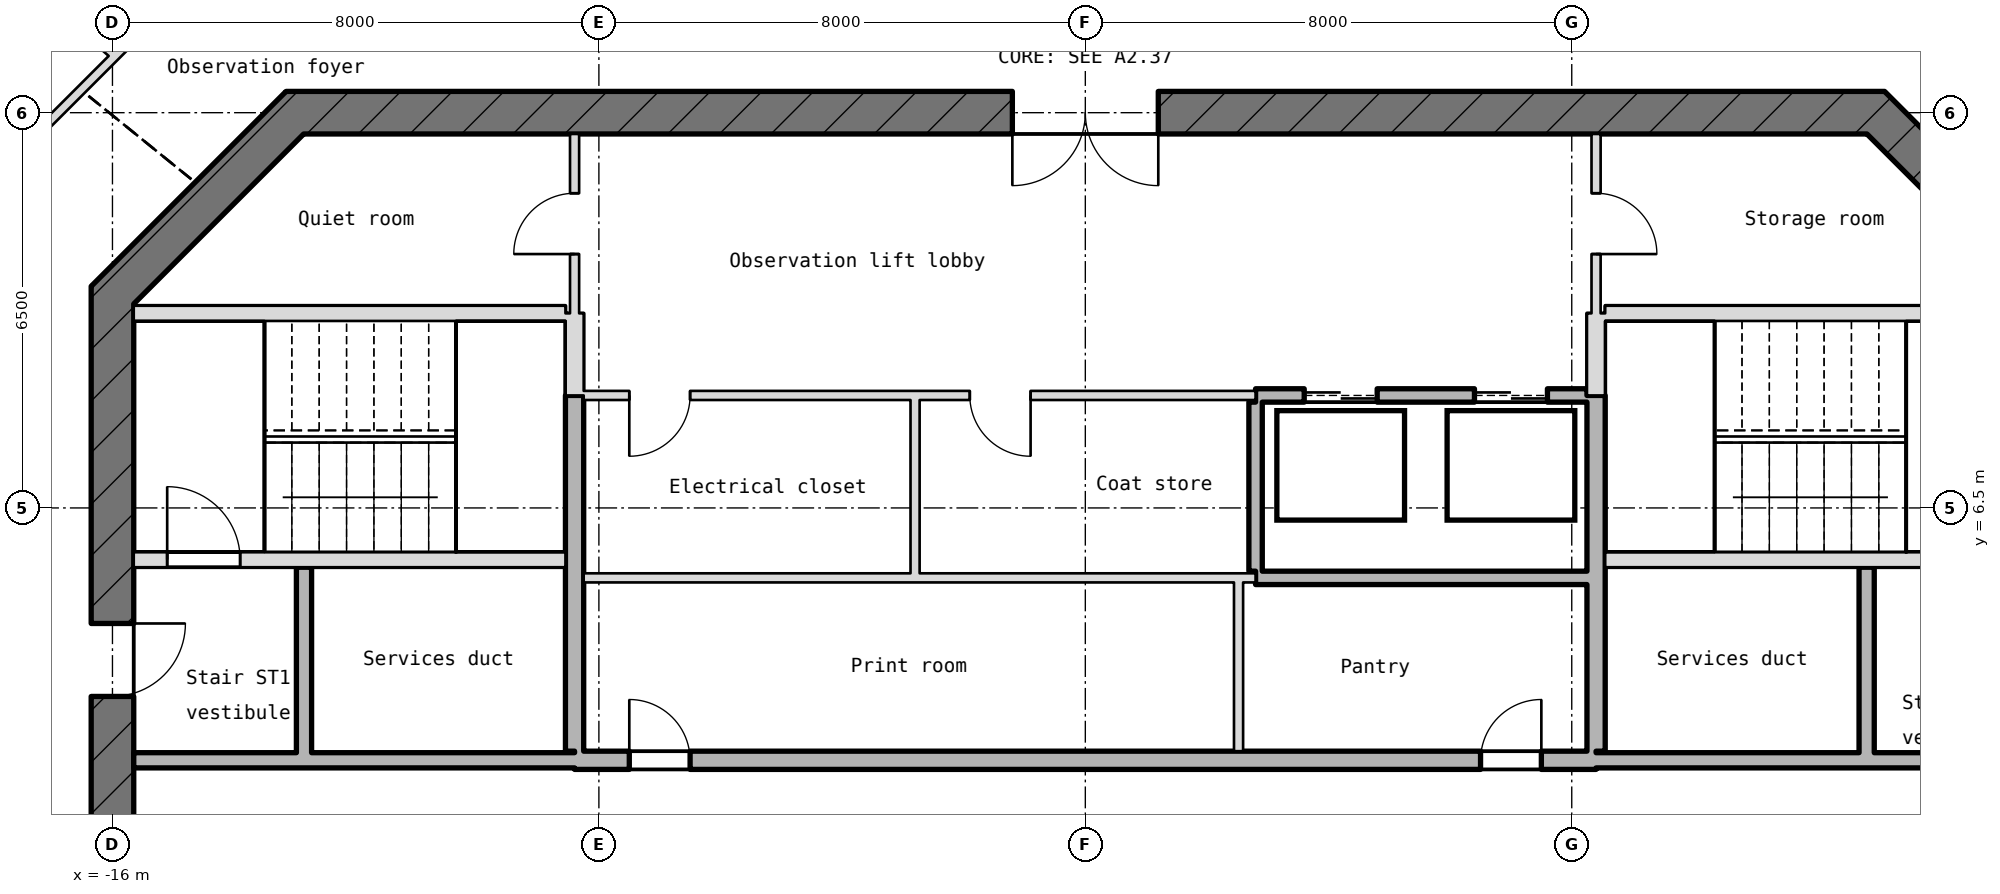
"""IFC4 building model, lengths in metres.
Left out: names, types, materials, properties, quantities, classifications, styles, units other than length and angle.
Written with IfcOpenShell. Run it as: python <this file> out.ifc"""

import sys

from ifc_helpers import new_model, si_unit, direction, frame, frame_2d, origin, place, context, subcontext, project, spatial, rectangle, extrude, element, fill, save


model = new_model("IFC4")
c1 = context("Model", 3, precision=1e-05, world=origin(), true_north=direction((0.0, 1.0)))
c2 = subcontext(c1, "Body", "Model", "MODEL_VIEW")
j1 = project(units=[si_unit("LENGTHUNIT", "METRE"), si_unit("PLANEANGLEUNIT", "RADIAN")], contexts=[c1])
p1 = place(None, origin())
s1 = spatial("IfcSite", under=j1, at=p1, CompositionType="ELEMENT")
p2 = place(p1, origin())
s2 = spatial("IfcBuilding", under=s1, at=p2, CompositionType="ELEMENT")
p3 = place(p2, frame((0.0, 0.0, 401.95)))
s3 = spatial("IfcBuildingStorey", under=s2, at=p3, CompositionType="ELEMENT", Elevation=401.95)
p4 = place(p3, frame((16.103, 9.897, -0.25), z_axis=(0.0, 0.0, 1.0), x_axis=(-0.707106781187, 0.707106781187, 0.0)))
e1 = element("IfcWall", 1, at=p4, inside=s3, PredefinedType="SHEAR", context=c2, shape_type="SweptSolid", body=[
    extrude(rectangle(XDim=4.533, YDim=0.7, at=frame_2d((2.266, 0.0))), origin(), (0.0, 0.0, 1.0), 5.55),
])
p5 = place(p3, frame((13.145, 13.0, -0.25), z_axis=(0.0, 0.0, 1.0), x_axis=(-1.0, 0.0, 0.0)))
e2 = element("IfcWall", 2, at=p5, inside=s3, PredefinedType="SHEAR", context=c2, shape_type="SweptSolid", body=[
    extrude(rectangle(XDim=26.29, YDim=0.7, at=frame_2d((13.145, 0.0))), origin(), (0.0, 0.0, 1.0), 5.55),
])
p6 = place(p5, frame((11.945, 0.0, 0.25)))
e3 = element("IfcOpeningElement", 3, at=p6, cuts=e2, PredefinedType="OPENING", context=c2, shape_type="SweptSolid", body=[
    extrude(rectangle(XDim=2.4, YDim=2.1, at=frame_2d((1.2, 1.05))), frame((0.0, 0.36, 0.0), z_axis=(0.0, -1.0, 0.0), x_axis=(1.0, 0.0, 0.0)), (0.0, 0.0, 1.0), 0.72),
])
p7 = place(p3, frame((-12.897, 13.103, -0.25), z_axis=(0.0, 0.0, 1.0), x_axis=(-0.707106781187, -0.707106781187, 0.0)))
e4 = element("IfcWall", 4, at=p7, inside=s3, PredefinedType="SHEAR", context=c2, shape_type="SweptSolid", body=[
    extrude(rectangle(XDim=4.533, YDim=0.7, at=frame_2d((2.266, 0.0))), origin(), (0.0, 0.0, 1.0), 5.55),
])
p8 = place(p3, frame((-16.0, 10.145, -0.25), z_axis=(0.0, 0.0, 1.0), x_axis=(0.0, -1.0, 0.0)))
e5 = element("IfcWall", 5, at=p8, inside=s3, PredefinedType="SHEAR", context=c2, shape_type="SweptSolid", body=[
    extrude(rectangle(XDim=20.29, YDim=0.7, at=frame_2d((10.145, 0.0))), origin(), (0.0, 0.0, 1.0), 5.55),
])
p9 = place(p8, frame((8.945, 0.0, 0.25)))
e6 = element("IfcOpeningElement", 6, at=p9, cuts=e5, PredefinedType="OPENING", context=c2, shape_type="SweptSolid", body=[
    extrude(rectangle(XDim=2.4, YDim=2.1, at=frame_2d((1.2, 1.05))), frame((0.0, 0.36, 0.0), z_axis=(0.0, -1.0, 0.0), x_axis=(1.0, 0.0, 0.0)), (0.0, 0.0, 1.0), 0.72),
])
p10 = place(p8, frame((5.545, 0.0, 0.25)))
e7 = element("IfcOpeningElement", 7, at=p10, cuts=e5, PredefinedType="OPENING", context=c2, shape_type="SweptSolid", body=[
    extrude(rectangle(XDim=1.2, YDim=2.1, at=frame_2d((0.6, 1.05))), frame((0.0, 0.36, 0.0), z_axis=(0.0, -1.0, 0.0), x_axis=(1.0, 0.0, 0.0)), (0.0, 0.0, 1.0), 0.72),
])
p11 = place(p3, frame((-15.65, 2.35, 0.0), z_axis=(0.0, 0.0, 1.0), x_axis=(1.0, 0.0, 0.0)))
e8 = element("IfcWall", 8, at=p11, inside=s3, PredefinedType="STANDARD", context=c2, shape_type="SweptSolid", body=[
    extrude(rectangle(XDim=7.25, YDim=0.25, at=frame_2d((3.625, 0.0))), origin(), (0.0, 0.0, 1.0), 5.3),
])
p12 = place(p3, frame((-8.4, 2.35, -0.25), z_axis=(0.0, 0.0, 1.0), x_axis=(1.0, 0.0, 0.0)))
e9 = element("IfcWall", 9, at=p12, inside=s3, PredefinedType="SHEAR", context=c2, shape_type="SweptSolid", body=[
    extrude(rectangle(XDim=16.8, YDim=0.3, at=frame_2d((8.4, 0.0))), origin(), (0.0, 0.0, 1.0), 5.55),
])
p13 = place(p12, frame((0.9, 0.0, 0.25)))
e10 = element("IfcOpeningElement", 10, at=p13, cuts=e9, PredefinedType="OPENING", context=c2, shape_type="SweptSolid", body=[
    extrude(rectangle(XDim=1.0, YDim=2.1, at=frame_2d((0.5, 1.05))), frame((0.0, 0.16, 0.0), z_axis=(0.0, -1.0, 0.0), x_axis=(1.0, 0.0, 0.0)), (0.0, 0.0, 1.0), 0.32),
])
p14 = place(p12, frame((14.9, 0.0, 0.25)))
e11 = element("IfcOpeningElement", 11, at=p14, cuts=e9, PredefinedType="OPENING", context=c2, shape_type="SweptSolid", body=[
    extrude(rectangle(XDim=1.0, YDim=2.1, at=frame_2d((0.5, 1.05))), frame((0.0, 0.16, 0.0), z_axis=(0.0, -1.0, 0.0), x_axis=(1.0, 0.0, 0.0)), (0.0, 0.0, 1.0), 0.32),
])
p15 = place(p3, frame((8.4, 2.35, 0.0), z_axis=(0.0, 0.0, 1.0), x_axis=(1.0, 0.0, 0.0)))
e12 = element("IfcWall", 12, at=p15, inside=s3, PredefinedType="STANDARD", context=c2, shape_type="SweptSolid", body=[
    extrude(rectangle(XDim=7.25, YDim=0.25, at=frame_2d((3.625, 0.0))), origin(), (0.0, 0.0, 1.0), 5.3),
])
p16 = place(p3, frame((-8.25, 5.35, 0.0), z_axis=(0.0, 0.0, 1.0), x_axis=(1.0, 0.0, 0.0)))
e13 = element("IfcWall", 13, at=p16, inside=s3, PredefinedType="PARTITIONING", context=c2, shape_type="SweptSolid", body=[
    extrude(rectangle(XDim=11.05, YDim=0.15, at=frame_2d((5.525, 0.0))), origin(), (0.0, 0.0, 1.0), 5.3),
])
p17 = place(p3, frame((2.8, 5.35, 0.0), z_axis=(0.0, 0.0, 1.0), x_axis=(1.0, 0.0, 0.0)))
e14 = element("IfcWall", 14, at=p17, inside=s3, PredefinedType="STANDARD", context=c2, shape_type="SweptSolid", body=[
    extrude(rectangle(XDim=5.45, YDim=0.22, at=frame_2d((2.725, 0.0))), origin(), (0.0, 0.0, 1.0), 5.3),
])
p18 = place(p3, frame((-15.65, 5.65, -0.25), z_axis=(0.0, 0.0, 1.0), x_axis=(1.0, 0.0, 0.0)))
e15 = element("IfcWall", 15, at=p18, inside=s3, PredefinedType="SHEAR", context=c2, shape_type="SweptSolid", body=[
    extrude(rectangle(XDim=7.1, YDim=0.25, at=frame_2d((3.55, 0.0))), origin(), (0.0, 0.0, 1.0), 5.55),
])
p19 = place(p18, frame((0.55, 0.0, 0.25)))
e16 = element("IfcOpeningElement", 16, at=p19, cuts=e15, PredefinedType="OPENING", context=c2, shape_type="SweptSolid", body=[
    extrude(rectangle(XDim=1.2, YDim=2.1, at=frame_2d((0.6, 1.05))), frame((0.0, 0.135, 0.0), z_axis=(0.0, -1.0, 0.0), x_axis=(1.0, 0.0, 0.0)), (0.0, 0.0, 1.0), 0.27),
])
p20 = place(p3, frame((8.55, 5.65, -0.25), z_axis=(0.0, 0.0, 1.0), x_axis=(1.0, 0.0, 0.0)))
e17 = element("IfcWall", 17, at=p20, inside=s3, PredefinedType="SHEAR", context=c2, shape_type="SweptSolid", body=[
    extrude(rectangle(XDim=7.1, YDim=0.25, at=frame_2d((3.55, 0.0))), origin(), (0.0, 0.0, 1.0), 5.55),
])
p21 = place(p20, frame((5.35, 0.0, 0.25)))
e18 = element("IfcOpeningElement", 18, at=p21, cuts=e17, PredefinedType="OPENING", context=c2, shape_type="SweptSolid", body=[
    extrude(rectangle(XDim=1.2, YDim=2.1, at=frame_2d((0.6, 1.05))), frame((0.0, 0.135, 0.0), z_axis=(0.0, -1.0, 0.0), x_axis=(1.0, 0.0, 0.0)), (0.0, 0.0, 1.0), 0.27),
])
p22 = place(p3, frame((-8.25, 8.35, 0.0), z_axis=(0.0, 0.0, 1.0), x_axis=(1.0, 0.0, 0.0)))
e19 = element("IfcWall", 19, at=p22, inside=s3, PredefinedType="PARTITIONING", context=c2, shape_type="SweptSolid", body=[
    extrude(rectangle(XDim=11.05, YDim=0.15, at=frame_2d((5.525, 0.0))), origin(), (0.0, 0.0, 1.0), 5.3),
])
p23 = place(p22, frame((0.75, 0.0, 0.0)))
e20 = element("IfcOpeningElement", 20, at=p23, cuts=e19, PredefinedType="OPENING", context=c2, shape_type="SweptSolid", body=[
    extrude(rectangle(XDim=1.0, YDim=2.1, at=frame_2d((0.5, 1.05))), frame((0.0, 0.085, 0.0), z_axis=(0.0, -1.0, 0.0), x_axis=(1.0, 0.0, 0.0)), (0.0, 0.0, 1.0), 0.17),
])
p24 = place(p22, frame((6.35, 0.0, 0.0)))
e21 = element("IfcOpeningElement", 21, at=p24, cuts=e19, PredefinedType="OPENING", context=c2, shape_type="SweptSolid", body=[
    extrude(rectangle(XDim=1.0, YDim=2.1, at=frame_2d((0.5, 1.05))), frame((0.0, 0.085, 0.0), z_axis=(0.0, -1.0, 0.0), x_axis=(1.0, 0.0, 0.0)), (0.0, 0.0, 1.0), 0.17),
])
p25 = place(p3, frame((2.8, 8.35, 0.0), z_axis=(0.0, 0.0, 1.0), x_axis=(1.0, 0.0, 0.0)))
e22 = element("IfcWall", 22, at=p25, inside=s3, PredefinedType="STANDARD", context=c2, shape_type="SweptSolid", body=[
    extrude(rectangle(XDim=5.45, YDim=0.22, at=frame_2d((2.725, 0.0))), origin(), (0.0, 0.0, 1.0), 5.3),
])
p26 = place(p25, frame((0.8, 0.0, 0.0)))
e23 = element("IfcOpeningElement", 23, at=p26, cuts=e22, PredefinedType="OPENING", context=c2, shape_type="SweptSolid", body=[
    extrude(rectangle(XDim=1.2, YDim=2.1, at=frame_2d((0.6, 1.05))), frame((0.0, 0.12, 0.0), z_axis=(0.0, -1.0, 0.0), x_axis=(1.0, 0.0, 0.0)), (0.0, 0.0, 1.0), 0.24),
])
p27 = place(p25, frame((3.6, 0.0, 0.0)))
e24 = element("IfcOpeningElement", 24, at=p27, cuts=e22, PredefinedType="OPENING", context=c2, shape_type="SweptSolid", body=[
    extrude(rectangle(XDim=1.2, YDim=2.1, at=frame_2d((0.6, 1.05))), frame((0.0, 0.12, 0.0), z_axis=(0.0, -1.0, 0.0), x_axis=(1.0, 0.0, 0.0)), (0.0, 0.0, 1.0), 0.24),
])
for number, where, z_axis, x_axis in (
    (25, (-15.65, 9.7, -0.25), (0.0, 0.0, 1.0), (1.0, 0.0, 0.0)),
    (26, (8.55, 9.7, -0.25), (0.0, 0.0, 1.0), (1.0, 0.0, 0.0)),
):
    element("IfcWall", number, at=place(p3, frame(where, z_axis=z_axis, x_axis=x_axis)), inside=s3, PredefinedType="SHEAR", context=c2, shape_type="SweptSolid", body=[
        extrude(rectangle(XDim=7.1, YDim=0.25, at=frame_2d((3.55, 0.0))), origin(), (0.0, 0.0, 1.0), 5.55),
    ])
p28 = place(p3, frame((-12.85, 2.475, 0.0), z_axis=(0.0, 0.0, 1.0), x_axis=(0.0, 1.0, 0.0)))
e27 = element("IfcWall", 27, at=p28, inside=s3, PredefinedType="STANDARD", context=c2, shape_type="SweptSolid", body=[
    extrude(rectangle(XDim=3.05, YDim=0.25, at=frame_2d((1.525, 0.0))), origin(), (0.0, 0.0, 1.0), 5.3),
])
p29 = place(p3, frame((-8.4, 2.5, -0.25), z_axis=(0.0, 0.0, 1.0), x_axis=(0.0, 1.0, 0.0)))
e28 = element("IfcWall", 28, at=p29, inside=s3, PredefinedType="SHEAR", context=c2, shape_type="SweptSolid", body=[
    extrude(rectangle(XDim=5.85, YDim=0.3, at=frame_2d((2.925, 0.0))), origin(), (0.0, 0.0, 1.0), 5.55),
])
p30 = place(p3, frame((-8.4, 8.35, -0.25), z_axis=(0.0, 0.0, 1.0), x_axis=(0.0, 1.0, 0.0)))
e29 = element("IfcWall", 29, at=p30, inside=s3, PredefinedType="SHEAR", context=c2, shape_type="SweptSolid", body=[
    extrude(rectangle(XDim=1.35, YDim=0.3, at=frame_2d((0.675, 0.0))), origin(), (0.0, 0.0, 1.0), 5.55),
])
p31 = place(p3, frame((-8.4, 9.7, 0.0), z_axis=(0.0, 0.0, 1.0), x_axis=(0.0, 1.0, 0.0)))
e30 = element("IfcWall", 30, at=p31, inside=s3, PredefinedType="PARTITIONING", context=c2, shape_type="SweptSolid", body=[
    extrude(rectangle(XDim=2.95, YDim=0.15, at=frame_2d((1.475, 0.0))), origin(), (0.0, 0.0, 1.0), 5.3),
])
p32 = place(p31, frame((0.975, 0.0, 0.0)))
e31 = element("IfcOpeningElement", 31, at=p32, cuts=e30, PredefinedType="OPENING", context=c2, shape_type="SweptSolid", body=[
    extrude(rectangle(XDim=1.0, YDim=2.1, at=frame_2d((0.5, 1.05))), frame((0.0, 0.085, 0.0), z_axis=(0.0, -1.0, 0.0), x_axis=(1.0, 0.0, 0.0)), (0.0, 0.0, 1.0), 0.17),
])
p33 = place(p3, frame((-2.8, 5.425, 0.0), z_axis=(0.0, 0.0, 1.0), x_axis=(0.0, 1.0, 0.0)))
e32 = element("IfcWall", 32, at=p33, inside=s3, PredefinedType="PARTITIONING", context=c2, shape_type="SweptSolid", body=[
    extrude(rectangle(XDim=2.85, YDim=0.15, at=frame_2d((1.425, 0.0))), origin(), (0.0, 0.0, 1.0), 5.3),
])
p34 = place(p3, frame((2.52, 2.5, 0.0), z_axis=(0.0, 0.0, 1.0), x_axis=(0.0, 1.0, 0.0)))
e33 = element("IfcWall", 33, at=p34, inside=s3, PredefinedType="PARTITIONING", context=c2, shape_type="SweptSolid", body=[
    extrude(rectangle(XDim=2.775, YDim=0.15, at=frame_2d((1.387, 0.0))), origin(), (0.0, 0.0, 1.0), 5.3),
])
p35 = place(p3, frame((2.8, 5.46, 0.0), z_axis=(0.0, 0.0, 1.0), x_axis=(0.0, 1.0, 0.0)))
e34 = element("IfcWall", 34, at=p35, inside=s3, PredefinedType="STANDARD", context=c2, shape_type="SweptSolid", body=[
    extrude(rectangle(XDim=2.78, YDim=0.22, at=frame_2d((1.39, 0.0))), origin(), (0.0, 0.0, 1.0), 5.3),
])
p36 = place(p3, frame((8.4, 2.5, -0.25), z_axis=(0.0, 0.0, 1.0), x_axis=(0.0, 1.0, 0.0)))
e35 = element("IfcWall", 35, at=p36, inside=s3, PredefinedType="SHEAR", context=c2, shape_type="SweptSolid", body=[
    extrude(rectangle(XDim=5.85, YDim=0.3, at=frame_2d((2.925, 0.0))), origin(), (0.0, 0.0, 1.0), 5.55),
])
p37 = place(p3, frame((8.4, 8.35, -0.25), z_axis=(0.0, 0.0, 1.0), x_axis=(0.0, 1.0, 0.0)))
e36 = element("IfcWall", 36, at=p37, inside=s3, PredefinedType="SHEAR", context=c2, shape_type="SweptSolid", body=[
    extrude(rectangle(XDim=1.35, YDim=0.3, at=frame_2d((0.675, 0.0))), origin(), (0.0, 0.0, 1.0), 5.55),
])
p38 = place(p3, frame((8.4, 9.7, 0.0), z_axis=(0.0, 0.0, 1.0), x_axis=(0.0, 1.0, 0.0)))
e37 = element("IfcWall", 37, at=p38, inside=s3, PredefinedType="PARTITIONING", context=c2, shape_type="SweptSolid", body=[
    extrude(rectangle(XDim=2.95, YDim=0.15, at=frame_2d((1.475, 0.0))), origin(), (0.0, 0.0, 1.0), 5.3),
])
p39 = place(p38, frame((0.975, 0.0, 0.0)))
e38 = element("IfcOpeningElement", 38, at=p39, cuts=e37, PredefinedType="OPENING", context=c2, shape_type="SweptSolid", body=[
    extrude(rectangle(XDim=1.0, YDim=2.1, at=frame_2d((0.5, 1.05))), frame((0.0, 0.085, 0.0), z_axis=(0.0, -1.0, 0.0), x_axis=(1.0, 0.0, 0.0)), (0.0, 0.0, 1.0), 0.17),
])
p40 = place(p3, frame((12.85, 2.475, 0.0), z_axis=(0.0, 0.0, 1.0), x_axis=(0.0, 1.0, 0.0)))
e39 = element("IfcWall", 39, at=p40, inside=s3, PredefinedType="STANDARD", context=c2, shape_type="SweptSolid", body=[
    extrude(rectangle(XDim=3.05, YDim=0.25, at=frame_2d((1.525, 0.0))), origin(), (0.0, 0.0, 1.0), 5.3),
])
p41 = place(p3, frame((-18.75, 11.139, 0.0), z_axis=(0.0, 0.0, 1.0), x_axis=(0.707106781187, 0.707106781187, 0.0)))
e40 = element("IfcWall", 40, at=p41, inside=s3, PredefinedType="PARTITIONING", context=c2, shape_type="SweptSolid", body=[
    extrude(rectangle(XDim=6.521, YDim=0.15, at=frame_2d((3.26, 0.0))), origin(), (0.0, 0.0, 1.0), 5.3),
])
p42 = place(p3, frame((-15.952, 13.937, 0.0), z_axis=(0.0, 0.0, 1.0), x_axis=(-0.753047703781, 0.657965923001, 0.0)))
e41 = element("IfcWall", 41, at=p42, inside=s3, PredefinedType="PARTITIONING", context=c2, shape_type="SweptSolid", body=[
    extrude(rectangle(XDim=0.77, YDim=0.15, at=frame_2d((0.385, 0.0))), origin(), (0.0, 0.0, 1.0), 4.99),
])
p43 = place(p26, origin())
e42 = element("IfcDoor", 42, at=p43, inside=s3, OperationType="DOUBLE_DOOR_SLIDING", PredefinedType="DOOR", context=c2, shape_type="SweptSolid", body=[
    extrude(rectangle(XDim=1.2, YDim=2.1, at=frame_2d((0.6, 1.05))), frame((0.0, 0.025, 0.0), z_axis=(0.0, -1.0, 0.0), x_axis=(1.0, 0.0, 0.0)), (0.0, 0.0, 1.0), 0.05),
])
fill(e23, e42)
p44 = place(p27, origin())
e43 = element("IfcDoor", 43, at=p44, inside=s3, OperationType="DOUBLE_DOOR_SLIDING", PredefinedType="DOOR", context=c2, shape_type="SweptSolid", body=[
    extrude(rectangle(XDim=1.2, YDim=2.1, at=frame_2d((0.6, 1.05))), frame((0.0, 0.025, 0.0), z_axis=(0.0, -1.0, 0.0), x_axis=(1.0, 0.0, 0.0)), (0.0, 0.0, 1.0), 0.05),
])
fill(e24, e43)
p45 = place(p19, origin())
e44 = element("IfcDoor", 44, at=p45, inside=s3, OperationType="SINGLE_SWING_RIGHT", PredefinedType="DOOR", context=c2, shape_type="SweptSolid", body=[
    extrude(rectangle(XDim=1.2, YDim=2.1, at=frame_2d((0.6, 1.05))), frame((0.0, 0.025, 0.0), z_axis=(0.0, -1.0, 0.0), x_axis=(1.0, 0.0, 0.0)), (0.0, 0.0, 1.0), 0.05),
])
fill(e16, e44)
p46 = place(p10, origin())
e45 = element("IfcDoor", 45, at=p46, inside=s3, OperationType="SINGLE_SWING_RIGHT", PredefinedType="DOOR", context=c2, shape_type="SweptSolid", body=[
    extrude(rectangle(XDim=1.2, YDim=2.1, at=frame_2d((0.6, 1.05))), frame((0.0, 0.025, 0.0), z_axis=(0.0, -1.0, 0.0), x_axis=(1.0, 0.0, 0.0)), (0.0, 0.0, 1.0), 0.05),
])
fill(e7, e45)
p47 = place(p6, origin())
e46 = element("IfcDoor", 46, at=p47, inside=s3, OperationType="DOUBLE_DOOR_SINGLE_SWING", PredefinedType="DOOR", context=c2, shape_type="SweptSolid", body=[
    extrude(rectangle(XDim=2.4, YDim=2.1, at=frame_2d((1.2, 1.05))), frame((0.0, 0.025, 0.0), z_axis=(0.0, -1.0, 0.0), x_axis=(1.0, 0.0, 0.0)), (0.0, 0.0, 1.0), 0.05),
])
fill(e3, e46)
p48 = place(p13, origin())
e47 = element("IfcDoor", 47, at=p48, inside=s3, OperationType="SINGLE_SWING_RIGHT", PredefinedType="DOOR", context=c2, shape_type="SweptSolid", body=[
    extrude(rectangle(XDim=1.0, YDim=2.1, at=frame_2d((0.5, 1.05))), frame((0.0, 0.025, 0.0), z_axis=(0.0, -1.0, 0.0), x_axis=(1.0, 0.0, 0.0)), (0.0, 0.0, 1.0), 0.05),
])
fill(e10, e47)
p49 = place(p14, origin())
e48 = element("IfcDoor", 48, at=p49, inside=s3, OperationType="SINGLE_SWING_RIGHT", PredefinedType="DOOR", context=c2, shape_type="SweptSolid", body=[
    extrude(rectangle(XDim=1.0, YDim=2.1, at=frame_2d((0.5, 1.05))), frame((0.0, 0.025, 0.0), z_axis=(0.0, -1.0, 0.0), x_axis=(1.0, 0.0, 0.0)), (0.0, 0.0, 1.0), 0.05),
])
fill(e11, e48)
p50 = place(p23, frame((1.0, 0.0, 0.0), z_axis=(0.0, 0.0, 1.0), x_axis=(-1.0, 0.0, 0.0)))
e49 = element("IfcDoor", 49, at=p50, inside=s3, OperationType="SINGLE_SWING_LEFT", PredefinedType="DOOR", context=c2, shape_type="SweptSolid", body=[
    extrude(rectangle(XDim=1.0, YDim=2.1, at=frame_2d((0.5, 1.05))), frame((0.0, 0.025, 0.0), z_axis=(0.0, -1.0, 0.0), x_axis=(1.0, 0.0, 0.0)), (0.0, 0.0, 1.0), 0.05),
])
fill(e20, e49)
p51 = place(p24, frame((1.0, 0.0, 0.0), z_axis=(0.0, 0.0, 1.0), x_axis=(-1.0, 0.0, 0.0)))
e50 = element("IfcDoor", 50, at=p51, inside=s3, OperationType="SINGLE_SWING_LEFT", PredefinedType="DOOR", context=c2, shape_type="SweptSolid", body=[
    extrude(rectangle(XDim=1.0, YDim=2.1, at=frame_2d((0.5, 1.05))), frame((0.0, 0.025, 0.0), z_axis=(0.0, -1.0, 0.0), x_axis=(1.0, 0.0, 0.0)), (0.0, 0.0, 1.0), 0.05),
])
fill(e21, e50)
p52 = place(p32, origin())
e51 = element("IfcDoor", 51, at=p52, inside=s3, OperationType="SINGLE_SWING_RIGHT", PredefinedType="DOOR", context=c2, shape_type="SweptSolid", body=[
    extrude(rectangle(XDim=1.0, YDim=2.1, at=frame_2d((0.5, 1.05))), frame((0.0, 0.025, 0.0), z_axis=(0.0, -1.0, 0.0), x_axis=(1.0, 0.0, 0.0)), (0.0, 0.0, 1.0), 0.05),
])
fill(e31, e51)
p53 = place(p39, frame((1.0, 0.0, 0.0), z_axis=(0.0, 0.0, 1.0), x_axis=(-1.0, 0.0, 0.0)))
e52 = element("IfcDoor", 52, at=p53, inside=s3, OperationType="SINGLE_SWING_LEFT", PredefinedType="DOOR", context=c2, shape_type="SweptSolid", body=[
    extrude(rectangle(XDim=1.0, YDim=2.1, at=frame_2d((0.5, 1.05))), frame((0.0, 0.025, 0.0), z_axis=(0.0, -1.0, 0.0), x_axis=(1.0, 0.0, 0.0)), (0.0, 0.0, 1.0), 0.05),
])
fill(e38, e52)
save(model, sys.argv[1])
